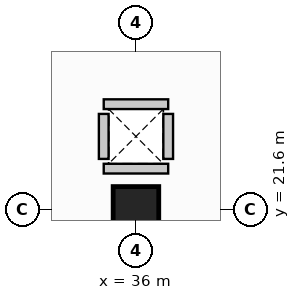
"""IFC4 building model, lengths in metres.
Left out: names, types, materials, properties, quantities, classifications, styles, units other than length and angle.
Written with IfcOpenShell. Run it as: python <this file> out.ifc"""

import sys

from ifc_helpers import new_model, si_unit, direction, frame, frame_2d, origin, origin_2d, place, context, subcontext, project, spatial, rectangle, extrude, element, save


model = new_model("IFC4")
c1 = context("Model", 3, precision=1e-05, world=origin(), true_north=direction((0.0, 1.0)))
c2 = subcontext(c1, "Body", "Model", "MODEL_VIEW")
j1 = project(units=[si_unit("LENGTHUNIT", "METRE"), si_unit("PLANEANGLEUNIT", "RADIAN")], contexts=[c1])
p1 = place(None, origin())
s1 = spatial("IfcSite", under=j1, at=p1, CompositionType="ELEMENT")
p2 = place(p1, origin())
s2 = spatial("IfcBuilding", under=s1, at=p2, CompositionType="ELEMENT")
p3 = place(p2, origin())
s3 = spatial("IfcBuildingStorey", under=s2, at=p3, CompositionType="ELEMENT", Elevation=0.0)
p4 = place(p3, frame((36.0, 21.6, 0.0), z_axis=(0.0, 0.0, 1.0), x_axis=(0.0, 1.0, 0.0)))
e1 = element("IfcColumn", 1, at=p4, inside=s3, PredefinedType="COLUMN", context=c2, shape_type="SweptSolid", body=[
    extrude(rectangle(XDim=0.75, YDim=0.75, at=origin_2d()), origin(), (0.0, 0.0, 1.0), 4.8),
])
for number, where, z_axis, x_axis in (
    (2, (35.47, 22.27, 0.0), (0.0, 0.0, 1.0), (1.0, 0.0, 0.0)),
    (3, (36.53, 23.33, 0.0), (0.0, 0.0, 1.0), (-1.0, 0.0, 0.0)),
):
    element("IfcWall", number, at=place(p3, frame(where, z_axis=z_axis, x_axis=x_axis)), inside=s3, PredefinedType="PARTITIONING", context=c2, shape_type="SweptSolid", body=[
        extrude(rectangle(XDim=1.06, YDim=0.16, at=frame_2d((0.53, 0.0))), origin(), (0.0, 0.0, 1.0), 3.55),
    ])
for number, where, z_axis, x_axis in (
    (4, (35.47, 23.17, 0.0), (0.0, 0.0, 1.0), (0.0, -1.0, 0.0)),
    (5, (36.53, 22.43, 0.0), (0.0, 0.0, 1.0), (0.0, 1.0, 0.0)),
):
    element("IfcWall", number, at=place(p3, frame(where, z_axis=z_axis, x_axis=x_axis)), inside=s3, PredefinedType="PARTITIONING", context=c2, shape_type="SweptSolid", body=[
        extrude(rectangle(XDim=0.74, YDim=0.16, at=frame_2d((0.37, 0.0))), origin(), (0.0, 0.0, 1.0), 3.55),
    ])
save(model, sys.argv[1])
